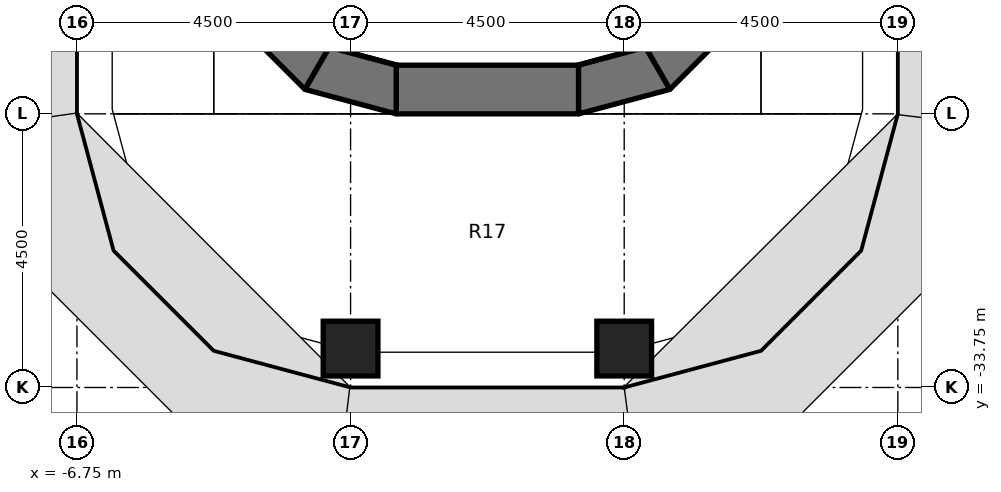
"""IFC4 building model, lengths in metres.
Left out: names, types, materials, properties, quantities, classifications, styles, units other than length and angle.
Written with IfcOpenShell. Run it as: python <this file> out.ifc"""

import sys

from ifc_helpers import new_model, si_unit, direction, frame, frame_2d, origin, origin_2d, place, context, subcontext, project, spatial, polyline, rectangle, outline, extrude, element, save


model = new_model("IFC4")
c1 = context("Model", 3, precision=1e-05, world=origin(), true_north=direction((0.0, 1.0)))
c2 = subcontext(c1, "Body", "Model", "MODEL_VIEW")
j1 = project(units=[si_unit("LENGTHUNIT", "METRE"), si_unit("PLANEANGLEUNIT", "RADIAN")], contexts=[c1])
p1 = place(None, origin())
s1 = spatial("IfcSite", under=j1, at=p1, CompositionType="ELEMENT")
p2 = place(p1, origin())
s2 = spatial("IfcBuilding", under=s1, at=p2, CompositionType="ELEMENT")
p3 = place(p2, frame((0.0, 0.0, 132.2)))
s3 = spatial("IfcBuildingStorey", under=s2, at=p3, CompositionType="ELEMENT", Elevation=132.2)
for number, where, z_axis, x_axis in (
    (1, (-2.25, -33.11, 0.0), (0.0, 0.0, 1.0), (1.0, 0.0, 0.0)),
    (2, (2.25, -33.11, 0.0), (0.0, 0.0, 1.0), (1.0, 0.0, 0.0)),
):
    element("IfcColumn", number, at=place(p3, frame(where, z_axis=z_axis, x_axis=x_axis)), inside=s3, PredefinedType="COLUMN", context=c2, shape_type="SweptSolid", body=[
        extrude(rectangle(XDim=0.9, YDim=0.9, at=origin_2d()), origin(), (0.0, 0.0, 1.0), 3.65),
    ])
p4 = place(p3, frame((-1.5, -28.85, 0.0), z_axis=(0.0, 0.0, 1.0), x_axis=(1.0, 0.0, 0.0)))
e3 = element("IfcWall", 3, at=p4, inside=s3, PredefinedType="SHEAR", context=c2, shape_type="SweptSolid", body=[
    extrude(rectangle(XDim=3.0, YDim=0.8, at=frame_2d((1.5, 0.0))), origin(), (0.0, 0.0, 1.0), 3.8),
])
p5 = place(p3, origin())
e4 = element("IfcWall", 4, at=p5, inside=s3, PredefinedType="SHEAR", context=c2, shape_type="SweptSolid", body=[
    extrude(outline(polyline([(-4.098, -27.75), (-3.0, -28.848), (-2.6, -28.155), (-3.405, -27.35), (-4.098, -27.75)])), origin(), (0.0, 0.0, 1.0), 3.8),
])
p6 = place(p3, origin())
e5 = element("IfcWall", 5, at=p6, inside=s3, PredefinedType="SHEAR", context=c2, shape_type="SweptSolid", body=[
    extrude(outline(polyline([(-3.0, -28.848), (-1.5, -29.25), (-1.5, -28.45), (-2.6, -28.155), (-3.0, -28.848)])), origin(), (0.0, 0.0, 1.0), 3.8),
])
p7 = place(p3, origin())
e6 = element("IfcWall", 6, at=p7, inside=s3, PredefinedType="SHEAR", context=c2, shape_type="SweptSolid", body=[
    extrude(outline(polyline([(4.098, -27.75), (3.0, -28.848), (2.6, -28.155), (3.405, -27.35), (4.098, -27.75)])), origin(), (0.0, 0.0, 1.0), 3.8),
])
p8 = place(p3, origin())
e7 = element("IfcWall", 7, at=p8, inside=s3, PredefinedType="SHEAR", context=c2, shape_type="SweptSolid", body=[
    extrude(outline(polyline([(3.0, -28.848), (1.5, -29.25), (1.5, -28.45), (2.6, -28.155), (3.0, -28.848)])), origin(), (0.0, 0.0, 1.0), 3.8),
])
save(model, sys.argv[1])
